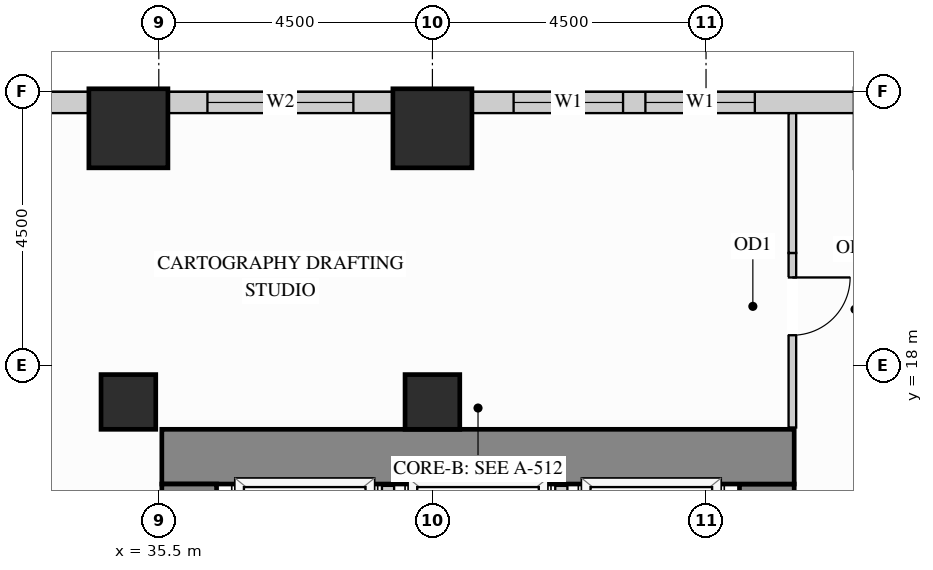
"""IFC4 building model, lengths in metres.
Left out: names, types, materials, properties, quantities, classifications, styles, units other than length and angle.
Written with IfcOpenShell. Run it as: python <this file> out.ifc"""

import sys

from ifc_helpers import new_model, si_unit, direction, frame, frame_2d, origin, origin_2d, place, context, subcontext, project, spatial, rectangle, extrude, source, transform, mapped, element, fill, save


model = new_model("IFC4")
c1 = context("Model", 3, precision=1e-05, world=origin(), true_north=direction((0.0, 1.0)))
c2 = subcontext(c1, "Body", "Model", "MODEL_VIEW")
j1 = project(units=[si_unit("LENGTHUNIT", "METRE"), si_unit("PLANEANGLEUNIT", "RADIAN")], contexts=[c1])
p1 = place(None, origin())
s1 = spatial("IfcSite", under=j1, at=p1, CompositionType="ELEMENT")
p2 = place(p1, origin())
s2 = spatial("IfcBuilding", under=s1, at=p2, CompositionType="ELEMENT")
p3 = place(p2, frame((0.0, 0.0, 47.7)))
s3 = spatial("IfcBuildingStorey", under=s2, at=p3, CompositionType="ELEMENT", Elevation=47.7)
m1 = source(origin(), c2, "Body", "SweptSolid", [
    extrude(rectangle(XDim=0.9, YDim=0.9, at=origin_2d()), origin(), (0.0, 0.0, 1.0), 3.38),
])
for number, where, z_axis, x_axis in (
    (1, (35.0, 17.4, 0.0), (0.0, 0.0, 1.0), (1.0, 0.0, 0.0)),
    (2, (40.0, 17.4, 0.0), (0.0, 0.0, 1.0), (1.0, 0.0, 0.0)),
):
    element("IfcColumn", number, at=place(p3, frame(where, z_axis=z_axis, x_axis=x_axis)), inside=s3, PredefinedType="COLUMN", context=c2, shape_type="MappedRepresentation", body=[
        mapped(m1, transform((0.0, 0.0, 0.0), x_axis=(1.0, 0.0, 0.0), y_axis=(0.0, 1.0, 0.0), z_axis=(0.0, 0.0, 1.0))),
    ])
m2 = source(origin(), c2, "Body", "SweptSolid", [
    extrude(rectangle(XDim=1.3, YDim=1.3, at=origin_2d()), origin(), (0.0, 0.0, 1.0), 3.38),
])
for number, where, z_axis, x_axis in (
    (3, (35.0, 21.9, 0.0), (0.0, 0.0, 1.0), (1.0, 0.0, 0.0)),
    (4, (40.0, 21.9, 0.0), (0.0, 0.0, 1.0), (1.0, 0.0, 0.0)),
):
    element("IfcColumn", number, at=place(p3, frame(where, z_axis=z_axis, x_axis=x_axis)), inside=s3, PredefinedType="COLUMN", context=c2, shape_type="MappedRepresentation", body=[
        mapped(m2, transform((0.0, 0.0, 0.0), x_axis=(1.0, 0.0, 0.0), y_axis=(0.0, 1.0, 0.0), z_axis=(0.0, 0.0, 1.0))),
    ])
m3 = source(origin(), c2, "Body", "SweptSolid", [
    extrude(rectangle(XDim=3.65, YDim=0.9, at=frame_2d((1.825, 0.0))), origin(), (0.0, 0.0, 1.0), 3.38),
])
p4 = place(p3, frame((45.5, 12.4, 0.0), z_axis=(0.0, 0.0, 1.0), x_axis=(0.0, 1.0, 0.0)))
e5 = element("IfcWall", 5, at=p4, inside=s3, PredefinedType="SHEAR", context=c2, shape_type="MappedRepresentation", body=[
    mapped(m3, transform((0.0, 0.0, 0.0), x_axis=(1.0, 0.0, 0.0), y_axis=(0.0, 1.0, 0.0), z_axis=(0.0, 0.0, 1.0))),
])
m4 = source(origin(), c2, "Body", "SweptSolid", [
    extrude(rectangle(XDim=10.4, YDim=0.9, at=frame_2d((5.2, 0.0))), origin(), (0.0, 0.0, 1.0), 3.38),
])
p5 = place(p3, frame((35.55, 16.5, 0.0), z_axis=(0.0, 0.0, 1.0), x_axis=(1.0, 0.0, 0.0)))
e6 = element("IfcWall", 6, at=p5, inside=s3, PredefinedType="SHEAR", context=c2, shape_type="MappedRepresentation", body=[
    mapped(m4, transform((0.0, 0.0, 0.0), x_axis=(1.0, 0.0, 0.0), y_axis=(0.0, 1.0, 0.0), z_axis=(0.0, 0.0, 1.0))),
])
p6 = place(p3, frame((36.0, 12.4, 0.0), z_axis=(0.0, 0.0, 1.0), x_axis=(0.0, 1.0, 0.0)))
e7 = element("IfcWall", 7, at=p6, inside=s3, PredefinedType="SHEAR", context=c2, shape_type="MappedRepresentation", body=[
    mapped(m3, transform((0.0, 0.0, 0.0), x_axis=(1.0, 0.0, 0.0), y_axis=(0.0, 1.0, 0.0), z_axis=(0.0, 0.0, 1.0))),
])
p7 = place(p3, frame((46.952, 22.325, 0.0), z_axis=(0.0, 0.0, 1.0), x_axis=(-1.0, 0.0, 0.0)))
e8 = element("IfcWall", 8, at=p7, inside=s3, PredefinedType="SOLIDWALL", context=c2, shape_type="SweptSolid", body=[
    extrude(rectangle(XDim=6.304, YDim=0.35, at=frame_2d((3.152, 0.0))), origin(), (0.0, 0.0, 1.0), 2.51),
])
p8 = place(p7, frame((1.649, 0.0, 0.78)))
e9 = element("IfcOpeningElement", 9, at=p8, cuts=e8, PredefinedType="OPENING", context=c2, shape_type="SweptSolid", body=[
    extrude(rectangle(XDim=1.8, YDim=1.55, at=frame_2d((0.9, 0.775))), frame((0.0, 0.185, 0.0), z_axis=(0.0, -1.0, 0.0), x_axis=(1.0, 0.0, 0.0)), (0.0, 0.0, 1.0), 0.37),
])
p9 = place(p7, frame((3.817, 0.0, 0.78)))
e10 = element("IfcOpeningElement", 10, at=p9, cuts=e8, PredefinedType="OPENING", context=c2, shape_type="SweptSolid", body=[
    extrude(rectangle(XDim=1.8, YDim=1.55, at=frame_2d((0.9, 0.775))), frame((0.0, 0.185, 0.0), z_axis=(0.0, -1.0, 0.0), x_axis=(1.0, 0.0, 0.0)), (0.0, 0.0, 1.0), 0.37),
])
p10 = place(p3, frame((39.352, 22.325, 0.0), z_axis=(0.0, 0.0, 1.0), x_axis=(-1.0, 0.0, 0.0)))
e11 = element("IfcWall", 11, at=p10, inside=s3, PredefinedType="SOLIDWALL", context=c2, shape_type="SweptSolid", body=[
    extrude(rectangle(XDim=3.704, YDim=0.35, at=frame_2d((1.852, 0.0))), origin(), (0.0, 0.0, 1.0), 2.51),
])
p11 = place(p10, frame((0.652, 0.0, 0.78)))
e12 = element("IfcOpeningElement", 12, at=p11, cuts=e11, PredefinedType="OPENING", context=c2, shape_type="SweptSolid", body=[
    extrude(rectangle(XDim=2.4, YDim=1.55, at=frame_2d((1.2, 0.775))), frame((0.0, 0.185, 0.0), z_axis=(0.0, -1.0, 0.0), x_axis=(1.0, 0.0, 0.0)), (0.0, 0.0, 1.0), 0.37),
])
p12 = place(p3, frame((34.352, 22.325, 0.0), z_axis=(0.0, 0.0, 1.0), x_axis=(-1.0, 0.0, 0.0)))
e13 = element("IfcWall", 13, at=p12, inside=s3, PredefinedType="SOLIDWALL", context=c2, shape_type="SweptSolid", body=[
    extrude(rectangle(XDim=14.854, YDim=0.35, at=frame_2d((7.427, 0.0))), origin(), (0.0, 0.0, 1.0), 3.365),
])
p13 = place(p12, frame((4.058, 0.0, 0.78)))
e14 = element("IfcOpeningElement", 14, at=p13, cuts=e13, PredefinedType="OPENING", context=c2, shape_type="SweptSolid", body=[
    extrude(rectangle(XDim=1.5, YDim=2.0, at=frame_2d((0.75, 1.0))), frame((0.0, 0.185, 0.0), z_axis=(0.0, -1.0, 0.0), x_axis=(1.0, 0.0, 0.0)), (0.0, 0.0, 1.0), 0.37),
])
p14 = place(p12, frame((9.296, 0.0, 0.78)))
e15 = element("IfcOpeningElement", 15, at=p14, cuts=e13, PredefinedType="OPENING", context=c2, shape_type="SweptSolid", body=[
    extrude(rectangle(XDim=1.5, YDim=2.0, at=frame_2d((0.75, 1.0))), frame((0.0, 0.185, 0.0), z_axis=(0.0, -1.0, 0.0), x_axis=(1.0, 0.0, 0.0)), (0.0, 0.0, 1.0), 0.37),
])
p15 = place(p3, frame((45.92, 16.98, 0.0), z_axis=(0.0, 0.0, 1.0), x_axis=(0.0, 1.0, 0.0)))
e16 = element("IfcWall", 16, at=p15, inside=s3, PredefinedType="PARTITIONING", context=c2, shape_type="SweptSolid", body=[
    extrude(rectangle(XDim=2.87, YDim=0.125, at=frame_2d((1.435, 0.0))), origin(), (0.0, 0.0, 1.0), 3.365),
])
p16 = place(p15, frame((1.517, 0.0, 0.0)))
e17 = element("IfcOpeningElement", 17, at=p16, cuts=e16, PredefinedType="OPENING", context=c2, shape_type="SweptSolid", body=[
    extrude(rectangle(XDim=0.95, YDim=2.15, at=frame_2d((0.475, 1.075))), frame((0.0, 0.073, 0.0), z_axis=(0.0, -1.0, 0.0), x_axis=(1.0, 0.0, 0.0)), (0.0, 0.0, 1.0), 0.145),
])
m5 = source(origin(), c2, "Body", "SweptSolid", [
    extrude(rectangle(XDim=2.298, YDim=0.125, at=frame_2d((1.149, 0.0))), origin(), (0.0, 0.0, 1.0), 3.365),
])
p17 = place(p3, frame((45.92, 19.85, 0.0), z_axis=(0.0, 0.0, 1.0), x_axis=(0.0, 1.0, 0.0)))
e18 = element("IfcWall", 18, at=p17, inside=s3, PredefinedType="PARTITIONING", context=c2, shape_type="MappedRepresentation", body=[
    mapped(m5, transform((0.0, 0.0, 0.0), x_axis=(1.0, 0.0, 0.0), y_axis=(0.0, 1.0, 0.0), z_axis=(0.0, 0.0, 1.0))),
])
m6 = source(origin(), c2, "Body", "SweptSolid", [
    extrude(rectangle(XDim=1.89, YDim=0.2, at=frame_2d((0.945, 0.0))), origin(), (0.0, 0.0, 1.0), 3.365),
])
for number, where, z_axis, x_axis in (
    (19, (39.27, 14.13, 0.0), (0.0, 0.0, 1.0), (0.0, 1.0, 0.0)),
    (20, (42.12, 14.13, 0.0), (0.0, 0.0, 1.0), (0.0, 1.0, 0.0)),
):
    element("IfcWall", number, at=place(p3, frame(where, z_axis=z_axis, x_axis=x_axis)), inside=s3, PredefinedType="PARTITIONING", context=c2, shape_type="MappedRepresentation", body=[
        mapped(m6, transform((0.0, 0.0, 0.0), x_axis=(1.0, 0.0, 0.0), y_axis=(0.0, 1.0, 0.0), z_axis=(0.0, 0.0, 1.0))),
    ])
m7 = source(origin(), c2, "Body", "SweptSolid", [
    extrude(rectangle(XDim=0.95, YDim=2.15, at=frame_2d((0.475, 1.075))), frame((0.0, 0.025, 0.0), z_axis=(0.0, -1.0, 0.0), x_axis=(1.0, 0.0, 0.0)), (0.0, 0.0, 1.0), 0.05),
])
p18 = place(p16, origin())
e21 = element("IfcDoor", 21, at=p18, inside=s3, OperationType="SINGLE_SWING_RIGHT", PredefinedType="DOOR", context=c2, shape_type="MappedRepresentation", body=[
    mapped(m7, transform((0.0, 0.0, 0.0), x_axis=(1.0, 0.0, 0.0), y_axis=(0.0, 1.0, 0.0), z_axis=(0.0, 0.0, 1.0))),
])
fill(e17, e21)
m8 = source(origin(), c2, "Body", "SweptSolid", [
    extrude(rectangle(XDim=1.8, YDim=1.55, at=frame_2d((0.9, 0.775))), frame((0.0, 0.03, 0.0), z_axis=(0.0, -1.0, 0.0), x_axis=(1.0, 0.0, 0.0)), (0.0, 0.0, 1.0), 0.06),
])
p19 = place(p8, origin())
e22 = element("IfcWindow", 22, at=p19, inside=s3, PartitioningType="SINGLE_PANEL", PredefinedType="WINDOW", context=c2, shape_type="MappedRepresentation", body=[
    mapped(m8, transform((0.0, 0.0, 0.0), x_axis=(1.0, 0.0, 0.0), y_axis=(0.0, 1.0, 0.0), z_axis=(0.0, 0.0, 1.0))),
])
fill(e9, e22)
p20 = place(p9, origin())
e23 = element("IfcWindow", 23, at=p20, inside=s3, PartitioningType="SINGLE_PANEL", PredefinedType="WINDOW", context=c2, shape_type="MappedRepresentation", body=[
    mapped(m8, transform((0.0, 0.0, 0.0), x_axis=(1.0, 0.0, 0.0), y_axis=(0.0, 1.0, 0.0), z_axis=(0.0, 0.0, 1.0))),
])
fill(e10, e23)
m9 = source(origin(), c2, "Body", "SweptSolid", [
    extrude(rectangle(XDim=2.4, YDim=1.55, at=frame_2d((1.2, 0.775))), frame((0.0, 0.03, 0.0), z_axis=(0.0, -1.0, 0.0), x_axis=(1.0, 0.0, 0.0)), (0.0, 0.0, 1.0), 0.06),
])
p21 = place(p11, origin())
e24 = element("IfcWindow", 24, at=p21, inside=s3, PartitioningType="SINGLE_PANEL", PredefinedType="WINDOW", context=c2, shape_type="MappedRepresentation", body=[
    mapped(m9, transform((0.0, 0.0, 0.0), x_axis=(1.0, 0.0, 0.0), y_axis=(0.0, 1.0, 0.0), z_axis=(0.0, 0.0, 1.0))),
])
fill(e12, e24)
save(model, sys.argv[1])
